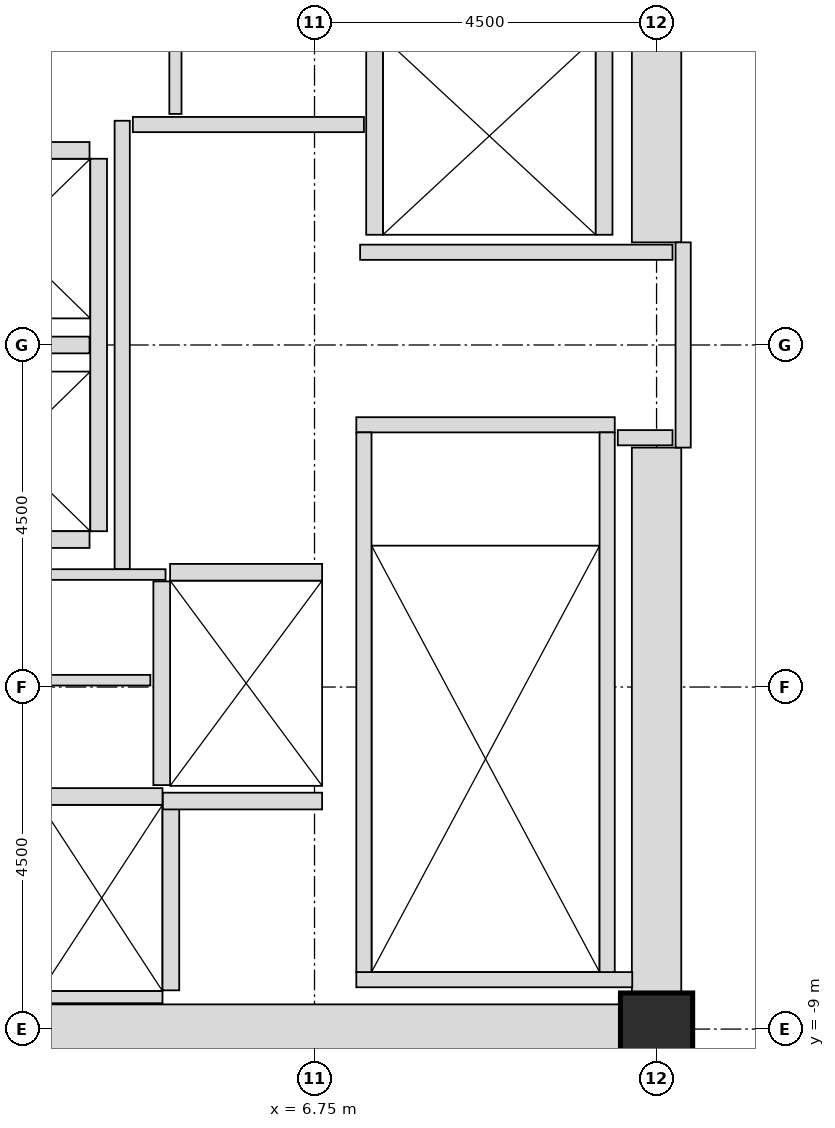
"""IFC4 building model, lengths in metres.
Left out: names, types, materials, properties, quantities, classifications, styles, units other than length and angle.
Written with IfcOpenShell. Run it as: python <this file> out.ifc"""

import sys

from ifc_helpers import new_model, si_unit, direction, frame, frame_2d, origin, origin_2d, place, context, subcontext, project, spatial, rectangle, hollow_rectangle, extrude, source, transform, mapped, element, fill, save


model = new_model("IFC4")
c1 = context("Model", 3, precision=1e-05, world=origin(), true_north=direction((0.0, 1.0)))
c2 = subcontext(c1, "Body", "Model", "MODEL_VIEW")
j1 = project(units=[si_unit("LENGTHUNIT", "METRE"), si_unit("PLANEANGLEUNIT", "RADIAN")], contexts=[c1])
p1 = place(None, origin())
s1 = spatial("IfcSite", under=j1, at=p1, CompositionType="ELEMENT")
p2 = place(p1, origin())
s2 = spatial("IfcBuilding", under=s1, at=p2, CompositionType="ELEMENT")
p3 = place(p2, frame((0.0, 0.0, 40.6)))
s3 = spatial("IfcBuildingStorey", under=s2, at=p3, CompositionType="ELEMENT", Elevation=40.6)
m1 = source(origin(), c2, "Body", "SweptSolid", [
    extrude(rectangle(XDim=10.025, YDim=0.65, at=frame_2d((5.012, 0.0))), origin(), (0.0, 0.0, 1.0), 3.8),
])
p4 = place(p3, frame((1.55, -9.0, 0.0), z_axis=(0.0, 0.0, 1.0), x_axis=(1.0, 0.0, 0.0)))
e1 = element("IfcWall", 1, at=p4, inside=s3, PredefinedType="SHEAR", context=c2, shape_type="MappedRepresentation", body=[
    mapped(m1, transform((0.0, 0.0, 0.0), x_axis=(1.0, 0.0, 0.0), y_axis=(0.0, 1.0, 0.0), z_axis=(0.0, 0.0, 1.0), scale=1.0)),
])
m2 = source(origin(), c2, "Body", "SweptSolid", [
    extrude(rectangle(XDim=7.325, YDim=0.65, at=frame_2d((3.663, 0.0))), origin(), (0.0, 0.0, 1.0), 3.8),
])
for number, where, z_axis, x_axis in (
    (2, (11.25, -8.675, 0.0), (0.0, 0.0, 1.0), (0.0, 1.0, 0.0)),
    (3, (11.25, 1.35, 0.0), (0.0, 0.0, 1.0), (0.0, 1.0, 0.0)),
):
    element("IfcWall", number, at=place(p3, frame(where, z_axis=z_axis, x_axis=x_axis)), inside=s3, PredefinedType="SHEAR", context=c2, shape_type="MappedRepresentation", body=[
        mapped(m2, transform((0.0, 0.0, 0.0), x_axis=(1.0, 0.0, 0.0), y_axis=(0.0, 1.0, 0.0), z_axis=(0.0, 0.0, 1.0), scale=1.0)),
    ])
m3 = source(origin(), c2, "Body", "SweptSolid", [
    extrude(hollow_rectangle(XDim=0.95, YDim=0.95, WallThickness=0.045, InnerFilletRadius=0.045, OuterFilletRadius=0.09, at=origin_2d()), origin(), (0.0, 0.0, 1.0), 3.8),
])
p5 = place(p3, frame((11.25, -9.0, 0.0), z_axis=(0.0, 0.0, 1.0), x_axis=(1.0, 0.0, 0.0)))
e4 = element("IfcColumn", 4, at=p5, inside=s3, PredefinedType="COLUMN", context=c2, shape_type="MappedRepresentation", body=[
    mapped(m3, transform((0.0, 0.0, 0.0), x_axis=(1.0, 0.0, 0.0), y_axis=(0.0, 1.0, 0.0), z_axis=(0.0, 0.0, 1.0), scale=1.0)),
])
m4 = source(origin(), c2, "Body", "SweptSolid", [
    extrude(rectangle(XDim=3.4, YDim=0.2, at=frame_2d((1.7, 0.0))), origin(), (0.0, 0.0, 1.0), 3.8),
])
p6 = place(p3, frame((7.3, -1.05, 0.0), z_axis=(0.0, 0.0, 1.0), x_axis=(1.0, 0.0, 0.0)))
e5 = element("IfcWall", 5, at=p6, inside=s3, PredefinedType="SOLIDWALL", context=c2, shape_type="MappedRepresentation", body=[
    mapped(m4, transform((0.0, 0.0, 0.0), x_axis=(1.0, 0.0, 0.0), y_axis=(0.0, 1.0, 0.0), z_axis=(0.0, 0.0, 1.0), scale=1.0)),
])
m5 = source(origin(), c2, "Body", "SweptSolid", [
    extrude(rectangle(XDim=3.63, YDim=0.2, at=frame_2d((1.815, 0.0))), origin(), (0.0, 0.0, 1.0), 3.8),
])
p7 = place(p3, frame((7.3, -8.35, 0.0), z_axis=(0.0, 0.0, 1.0), x_axis=(1.0, 0.0, 0.0)))
e6 = element("IfcWall", 6, at=p7, inside=s3, PredefinedType="SOLIDWALL", context=c2, shape_type="MappedRepresentation", body=[
    mapped(m5, transform((0.0, 0.0, 0.0), x_axis=(1.0, 0.0, 0.0), y_axis=(0.0, 1.0, 0.0), z_axis=(0.0, 0.0, 1.0), scale=1.0)),
])
m6 = source(origin(), c2, "Body", "SweptSolid", [
    extrude(rectangle(XDim=7.1, YDim=0.2, at=frame_2d((3.55, 0.0))), origin(), (0.0, 0.0, 1.0), 3.8),
])
p8 = place(p3, frame((7.4, -1.15, 0.0), z_axis=(0.0, 0.0, 1.0), x_axis=(0.0, -1.0, 0.0)))
e7 = element("IfcWall", 7, at=p8, inside=s3, PredefinedType="SOLIDWALL", context=c2, shape_type="MappedRepresentation", body=[
    mapped(m6, transform((0.0, 0.0, 0.0), x_axis=(1.0, 0.0, 0.0), y_axis=(0.0, 1.0, 0.0), z_axis=(0.0, 0.0, 1.0), scale=1.0)),
])
p9 = place(p8, frame((0.18, 0.0, 0.0)))
e8 = element("IfcOpeningElement", 8, at=p9, cuts=e7, PredefinedType="OPENING", context=c2, shape_type="SweptSolid", body=[
    extrude(rectangle(XDim=1.1, YDim=2.15, at=frame_2d((0.55, 1.075))), frame((0.0, 0.11, 0.0), z_axis=(0.0, -1.0, 0.0), x_axis=(1.0, 0.0, 0.0)), (0.0, 0.0, 1.0), 0.22),
])
p10 = place(p3, frame((10.6, -1.15, 0.0), z_axis=(0.0, 0.0, 1.0), x_axis=(0.0, -1.0, 0.0)))
e9 = element("IfcWall", 9, at=p10, inside=s3, PredefinedType="SOLIDWALL", context=c2, shape_type="MappedRepresentation", body=[
    mapped(m6, transform((0.0, 0.0, 0.0), x_axis=(1.0, 0.0, 0.0), y_axis=(0.0, 1.0, 0.0), z_axis=(0.0, 0.0, 1.0), scale=1.0)),
])
m7 = source(origin(), c2, "Body", "SweptSolid", [
    extrude(rectangle(XDim=2.0, YDim=0.22, at=frame_2d((1.0, 0.0))), origin(), (0.0, 0.0, 1.0), 3.535),
])
p11 = place(p3, frame((6.85, -2.99, 0.0), z_axis=(0.0, 0.0, 1.0), x_axis=(-1.0, 0.0, 0.0)))
e10 = element("IfcWall", 10, at=p11, inside=s3, PredefinedType="SOLIDWALL", context=c2, shape_type="MappedRepresentation", body=[
    mapped(m7, transform((0.0, 0.0, 0.0), x_axis=(1.0, 0.0, 0.0), y_axis=(0.0, 1.0, 0.0), z_axis=(0.0, 0.0, 1.0), scale=1.0)),
])
p12 = place(p11, frame((0.4, 0.0, 0.0)))
e11 = element("IfcOpeningElement", 11, at=p12, cuts=e10, PredefinedType="OPENING", context=c2, shape_type="SweptSolid", body=[
    extrude(rectangle(XDim=1.2, YDim=2.2, at=frame_2d((0.6, 1.1))), frame((0.0, 0.12, 0.0), z_axis=(0.0, -1.0, 0.0), x_axis=(1.0, 0.0, 0.0)), (0.0, 0.0, 1.0), 0.24),
])
m8 = source(origin(), c2, "Body", "SweptSolid", [
    extrude(rectangle(XDim=2.68, YDim=0.22, at=frame_2d((1.34, 0.0))), origin(), (0.0, 0.0, 1.0), 3.535),
])
p13 = place(p3, frame((4.74, -3.11, 0.0), z_axis=(0.0, 0.0, 1.0), x_axis=(0.0, -1.0, 0.0)))
e12 = element("IfcWall", 12, at=p13, inside=s3, PredefinedType="SOLIDWALL", context=c2, shape_type="MappedRepresentation", body=[
    mapped(m8, transform((0.0, 0.0, 0.0), x_axis=(1.0, 0.0, 0.0), y_axis=(0.0, 1.0, 0.0), z_axis=(0.0, 0.0, 1.0), scale=1.0)),
])
m9 = source(origin(), c2, "Body", "SweptSolid", [
    extrude(rectangle(XDim=5.45, YDim=0.22, at=frame_2d((2.725, 0.0))), origin(), (0.0, 0.0, 1.0), 3.535),
])
p14 = place(p3, frame((7.54, 6.9, 0.0), z_axis=(0.0, 0.0, 1.0), x_axis=(0.0, -1.0, 0.0)))
e13 = element("IfcWall", 13, at=p14, inside=s3, PredefinedType="SOLIDWALL", context=c2, shape_type="MappedRepresentation", body=[
    mapped(m9, transform((0.0, 0.0, 0.0), x_axis=(1.0, 0.0, 0.0), y_axis=(0.0, 1.0, 0.0), z_axis=(0.0, 0.0, 1.0), scale=1.0)),
])
p15 = place(p14, frame((3.5, 0.0, 0.0)))
e14 = element("IfcOpeningElement", 14, at=p15, cuts=e13, PredefinedType="OPENING", context=c2, shape_type="SweptSolid", body=[
    extrude(rectangle(XDim=1.3, YDim=2.3, at=frame_2d((0.65, 1.15))), frame((0.0, 0.12, 0.0), z_axis=(0.0, -1.0, 0.0), x_axis=(1.0, 0.0, 0.0)), (0.0, 0.0, 1.0), 0.24),
])
p16 = place(p14, frame((0.65, 0.0, 0.0)))
e15 = element("IfcOpeningElement", 15, at=p16, cuts=e13, PredefinedType="OPENING", context=c2, shape_type="SweptSolid", body=[
    extrude(rectangle(XDim=1.3, YDim=2.3, at=frame_2d((0.65, 1.15))), frame((0.0, 0.12, 0.0), z_axis=(0.0, -1.0, 0.0), x_axis=(1.0, 0.0, 0.0)), (0.0, 0.0, 1.0), 0.24),
])
p17 = place(p3, frame((10.56, 1.45, 0.0), z_axis=(0.0, 0.0, 1.0), x_axis=(0.0, 1.0, 0.0)))
e16 = element("IfcWall", 16, at=p17, inside=s3, PredefinedType="SOLIDWALL", context=c2, shape_type="MappedRepresentation", body=[
    mapped(m9, transform((0.0, 0.0, 0.0), x_axis=(1.0, 0.0, 0.0), y_axis=(0.0, 1.0, 0.0), z_axis=(0.0, 0.0, 1.0), scale=1.0)),
])
m10 = source(origin(), c2, "Body", "SweptSolid", [
    extrude(rectangle(XDim=3.2, YDim=0.22, at=frame_2d((1.6, 0.0))), origin(), (0.0, 0.0, 1.0), 3.535),
])
p18 = place(p3, frame((4.75, -5.94, 0.0), z_axis=(0.0, 0.0, 1.0), x_axis=(-1.0, 0.0, 0.0)))
e17 = element("IfcWall", 17, at=p18, inside=s3, PredefinedType="SOLIDWALL", context=c2, shape_type="MappedRepresentation", body=[
    mapped(m10, transform((0.0, 0.0, 0.0), x_axis=(1.0, 0.0, 0.0), y_axis=(0.0, 1.0, 0.0), z_axis=(0.0, 0.0, 1.0), scale=1.0)),
])
m11 = source(origin(), c2, "Body", "SweptSolid", [
    extrude(rectangle(XDim=3.2, YDim=0.16, at=frame_2d((1.6, 0.0))), origin(), (0.0, 0.0, 1.0), 2.425),
])
p19 = place(p3, frame((1.55, -8.58, 0.0), z_axis=(0.0, 0.0, 1.0), x_axis=(1.0, 0.0, 0.0)))
e18 = element("IfcWall", 18, at=p19, inside=s3, PredefinedType="PARTITIONING", context=c2, shape_type="MappedRepresentation", body=[
    mapped(m11, transform((0.0, 0.0, 0.0), x_axis=(1.0, 0.0, 0.0), y_axis=(0.0, 1.0, 0.0), z_axis=(0.0, 0.0, 1.0), scale=1.0)),
])
m12 = source(origin(), c2, "Body", "SweptSolid", [
    extrude(rectangle(XDim=2.43, YDim=0.22, at=frame_2d((1.215, 0.0))), origin(), (0.0, 0.0, 1.0), 3.535),
])
p20 = place(p3, frame((4.86, -8.49, 0.0), z_axis=(0.0, 0.0, 1.0), x_axis=(0.0, 1.0, 0.0)))
e19 = element("IfcWall", 19, at=p20, inside=s3, PredefinedType="SOLIDWALL", context=c2, shape_type="MappedRepresentation", body=[
    mapped(m12, transform((0.0, 0.0, 0.0), x_axis=(1.0, 0.0, 0.0), y_axis=(0.0, 1.0, 0.0), z_axis=(0.0, 0.0, 1.0), scale=1.0)),
])
m13 = source(origin(), c2, "Body", "SweptSolid", [
    extrude(rectangle(XDim=4.9, YDim=0.22, at=frame_2d((2.45, 0.0))), origin(), (0.0, 0.0, 1.0), 3.535),
])
p21 = place(p3, frame((3.91, -2.45, 0.0), z_axis=(0.0, 0.0, 1.0), x_axis=(0.0, 1.0, 0.0)))
e20 = element("IfcWall", 20, at=p21, inside=s3, PredefinedType="SOLIDWALL", context=c2, shape_type="MappedRepresentation", body=[
    mapped(m13, transform((0.0, 0.0, 0.0), x_axis=(1.0, 0.0, 0.0), y_axis=(0.0, 1.0, 0.0), z_axis=(0.0, 0.0, 1.0), scale=1.0)),
])
m14 = source(origin(), c2, "Body", "SweptSolid", [
    extrude(rectangle(XDim=2.13, YDim=0.22, at=frame_2d((1.065, 0.0))), origin(), (0.0, 0.0, 1.0), 3.535),
])
for number, where, z_axis, x_axis in (
    (21, (1.66, -2.56, 0.0), (0.0, 0.0, 1.0), (1.0, 0.0, 0.0)),
    (22, (1.66, 0.0, 0.0), (0.0, 0.0, 1.0), (1.0, 0.0, 0.0)),
    (23, (3.79, 2.56, 0.0), (0.0, 0.0, 1.0), (-1.0, 0.0, 0.0)),
):
    element("IfcWall", number, at=place(p3, frame(where, z_axis=z_axis, x_axis=x_axis)), inside=s3, PredefinedType="SOLIDWALL", context=c2, shape_type="MappedRepresentation", body=[
        mapped(m14, transform((0.0, 0.0, 0.0), x_axis=(1.0, 0.0, 0.0), y_axis=(0.0, 1.0, 0.0), z_axis=(0.0, 0.0, 1.0), scale=1.0)),
    ])
m15 = source(origin(), c2, "Body", "SweptSolid", [
    extrude(rectangle(XDim=2.095, YDim=0.22, at=frame_2d((1.048, 0.0))), origin(), (0.0, 0.0, 1.0), 3.535),
])
p22 = place(p3, frame((4.755, -6.0, 0.0), z_axis=(0.0, 0.0, 1.0), x_axis=(1.0, 0.0, 0.0)))
e24 = element("IfcWall", 24, at=p22, inside=s3, PredefinedType="SOLIDWALL", context=c2, shape_type="MappedRepresentation", body=[
    mapped(m15, transform((0.0, 0.0, 0.0), x_axis=(1.0, 0.0, 0.0), y_axis=(0.0, 1.0, 0.0), z_axis=(0.0, 0.0, 1.0), scale=1.0)),
])
m16 = source(origin(), c2, "Body", "SweptSolid", [
    extrude(rectangle(XDim=2.7, YDim=0.2, at=frame_2d((1.35, 0.0))), origin(), (0.0, 0.0, 1.0), 2.425),
])
p23 = place(p3, frame((11.6, -1.35, 0.0), z_axis=(0.0, 0.0, 1.0), x_axis=(0.0, 1.0, 0.0)))
e25 = element("IfcWall", 25, at=p23, inside=s3, PredefinedType="PARTITIONING", context=c2, shape_type="MappedRepresentation", body=[
    mapped(m16, transform((0.0, 0.0, 0.0), x_axis=(1.0, 0.0, 0.0), y_axis=(0.0, 1.0, 0.0), z_axis=(0.0, 0.0, 1.0), scale=1.0)),
])
p24 = place(p23, frame((0.75, 0.0, 0.0)))
e26 = element("IfcOpeningElement", 26, at=p24, cuts=e25, PredefinedType="OPENING", context=c2, shape_type="SweptSolid", body=[
    extrude(rectangle(XDim=1.2, YDim=2.15, at=frame_2d((0.6, 1.075))), frame((0.0, 0.11, 0.0), z_axis=(0.0, -1.0, 0.0), x_axis=(1.0, 0.0, 0.0)), (0.0, 0.0, 1.0), 0.22),
])
m17 = source(origin(), c2, "Body", "SweptSolid", [
    extrude(rectangle(XDim=5.9, YDim=0.2, at=frame_2d((2.95, 0.0))), origin(), (0.0, 0.0, 1.0), 3.535),
])
p25 = place(p3, frame((4.22, -2.95, 0.0), z_axis=(0.0, 0.0, 1.0), x_axis=(0.0, 1.0, 0.0)))
e27 = element("IfcWall", 27, at=p25, inside=s3, PredefinedType="PARTITIONING", context=c2, shape_type="MappedRepresentation", body=[
    mapped(m17, transform((0.0, 0.0, 0.0), x_axis=(1.0, 0.0, 0.0), y_axis=(0.0, 1.0, 0.0), z_axis=(0.0, 0.0, 1.0), scale=1.0)),
])
m18 = source(origin(), c2, "Body", "SweptSolid", [
    extrude(rectangle(XDim=3.04, YDim=0.2, at=frame_2d((1.52, 0.0))), origin(), (0.0, 0.0, 1.0), 3.535),
])
p26 = place(p3, frame((4.36, 2.9, 0.0), z_axis=(0.0, 0.0, 1.0), x_axis=(1.0, 0.0, 0.0)))
e28 = element("IfcWall", 28, at=p26, inside=s3, PredefinedType="PARTITIONING", context=c2, shape_type="MappedRepresentation", body=[
    mapped(m18, transform((0.0, 0.0, 0.0), x_axis=(1.0, 0.0, 0.0), y_axis=(0.0, 1.0, 0.0), z_axis=(0.0, 0.0, 1.0), scale=1.0)),
])
p27 = place(p26, frame((1.19, 0.0, 0.0)))
e29 = element("IfcOpeningElement", 29, at=p27, cuts=e28, PredefinedType="OPENING", context=c2, shape_type="SweptSolid", body=[
    extrude(rectangle(XDim=1.2, YDim=2.15, at=frame_2d((0.6, 1.075))), frame((0.0, 0.11, 0.0), z_axis=(0.0, -1.0, 0.0), x_axis=(1.0, 0.0, 0.0)), (0.0, 0.0, 1.0), 0.22),
])
m19 = source(origin(), c2, "Body", "SweptSolid", [
    extrude(rectangle(XDim=4.11, YDim=0.2, at=frame_2d((2.055, 0.0))), origin(), (0.0, 0.0, 1.0), 3.535),
])
p28 = place(p3, frame((7.35, 1.22, 0.0), z_axis=(0.0, 0.0, 1.0), x_axis=(1.0, 0.0, 0.0)))
e30 = element("IfcWall", 30, at=p28, inside=s3, PredefinedType="PARTITIONING", context=c2, shape_type="MappedRepresentation", body=[
    mapped(m19, transform((0.0, 0.0, 0.0), x_axis=(1.0, 0.0, 0.0), y_axis=(0.0, 1.0, 0.0), z_axis=(0.0, 0.0, 1.0), scale=1.0)),
])
m20 = source(origin(), c2, "Body", "SweptSolid", [
    extrude(rectangle(XDim=0.72, YDim=0.2, at=frame_2d((0.36, 0.0))), origin(), (0.0, 0.0, 1.0), 3.535),
])
p29 = place(p3, frame((10.74, -1.22, 0.0), z_axis=(0.0, 0.0, 1.0), x_axis=(1.0, 0.0, 0.0)))
e31 = element("IfcWall", 31, at=p29, inside=s3, PredefinedType="PARTITIONING", context=c2, shape_type="MappedRepresentation", body=[
    mapped(m20, transform((0.0, 0.0, 0.0), x_axis=(1.0, 0.0, 0.0), y_axis=(0.0, 1.0, 0.0), z_axis=(0.0, 0.0, 1.0), scale=1.0)),
])
m21 = source(origin(), c2, "Body", "SweptSolid", [
    extrude(rectangle(XDim=3.015, YDim=0.16, at=frame_2d((1.507, 0.0))), origin(), (0.0, 0.0, 1.0), 3.535),
])
p30 = place(p3, frame((4.92, 3.04, 0.0), z_axis=(0.0, 0.0, 1.0), x_axis=(0.0, 1.0, 0.0)))
e32 = element("IfcWall", 32, at=p30, inside=s3, PredefinedType="PARTITIONING", context=c2, shape_type="MappedRepresentation", body=[
    mapped(m21, transform((0.0, 0.0, 0.0), x_axis=(1.0, 0.0, 0.0), y_axis=(0.0, 1.0, 0.0), z_axis=(0.0, 0.0, 1.0), scale=1.0)),
])
m22 = source(origin(), c2, "Body", "SweptSolid", [
    extrude(rectangle(XDim=3.15, YDim=0.14, at=frame_2d((1.575, 0.0))), origin(), (0.0, 0.0, 1.0), 3.535),
])
p31 = place(p3, frame((1.64, -3.02, 0.0), z_axis=(0.0, 0.0, 1.0), x_axis=(1.0, 0.0, 0.0)))
e33 = element("IfcWall", 33, at=p31, inside=s3, PredefinedType="PARTITIONING", context=c2, shape_type="MappedRepresentation", body=[
    mapped(m22, transform((0.0, 0.0, 0.0), x_axis=(1.0, 0.0, 0.0), y_axis=(0.0, 1.0, 0.0), z_axis=(0.0, 0.0, 1.0), scale=1.0)),
])
m23 = source(origin(), c2, "Body", "SweptSolid", [
    extrude(rectangle(XDim=2.95, YDim=0.14, at=frame_2d((1.475, 0.0))), origin(), (0.0, 0.0, 1.0), 3.535),
])
p32 = place(p3, frame((1.64, -4.41, 0.0), z_axis=(0.0, 0.0, 1.0), x_axis=(1.0, 0.0, 0.0)))
e34 = element("IfcWall", 34, at=p32, inside=s3, PredefinedType="PARTITIONING", context=c2, shape_type="MappedRepresentation", body=[
    mapped(m23, transform((0.0, 0.0, 0.0), x_axis=(1.0, 0.0, 0.0), y_axis=(0.0, 1.0, 0.0), z_axis=(0.0, 0.0, 1.0), scale=1.0)),
])
m24 = source(origin(), c2, "Body", "SweptSolid", [
    extrude(rectangle(XDim=1.1, YDim=2.15, at=frame_2d((0.55, 1.075))), frame((0.0, 0.025, 0.0), z_axis=(0.0, -1.0, 0.0), x_axis=(1.0, 0.0, 0.0)), (0.0, 0.0, 1.0), 0.05),
])
p33 = place(p9, origin())
e35 = element("IfcDoor", 35, at=p33, inside=s3, OperationType="SINGLE_SWING_LEFT", PredefinedType="DOOR", context=c2, shape_type="MappedRepresentation", body=[
    mapped(m24, transform((0.0, 0.0, 0.0), x_axis=(1.0, 0.0, 0.0), y_axis=(0.0, 1.0, 0.0), z_axis=(0.0, 0.0, 1.0), scale=1.0)),
])
fill(e8, e35)
m25 = source(origin(), c2, "Body", "SweptSolid", [
    extrude(rectangle(XDim=1.2, YDim=2.2, at=frame_2d((0.6, 1.1))), frame((0.0, 0.025, 0.0), z_axis=(0.0, -1.0, 0.0), x_axis=(1.0, 0.0, 0.0)), (0.0, 0.0, 1.0), 0.05),
])
p34 = place(p12, origin())
e36 = element("IfcDoor", 36, at=p34, inside=s3, OperationType="SLIDING_TO_LEFT", PredefinedType="DOOR", context=c2, shape_type="MappedRepresentation", body=[
    mapped(m25, transform((0.0, 0.0, 0.0), x_axis=(1.0, 0.0, 0.0), y_axis=(0.0, 1.0, 0.0), z_axis=(0.0, 0.0, 1.0), scale=1.0)),
])
fill(e11, e36)
m26 = source(origin(), c2, "Body", "SweptSolid", [
    extrude(rectangle(XDim=1.3, YDim=2.3, at=frame_2d((0.65, 1.15))), frame((0.0, 0.025, 0.0), z_axis=(0.0, -1.0, 0.0), x_axis=(1.0, 0.0, 0.0)), (0.0, 0.0, 1.0), 0.05),
])
p35 = place(p15, origin())
e37 = element("IfcDoor", 37, at=p35, inside=s3, OperationType="SLIDING_TO_RIGHT", PredefinedType="DOOR", context=c2, shape_type="MappedRepresentation", body=[
    mapped(m26, transform((0.0, 0.0, 0.0), x_axis=(1.0, 0.0, 0.0), y_axis=(0.0, 1.0, 0.0), z_axis=(0.0, 0.0, 1.0), scale=1.0)),
])
fill(e14, e37)
m27 = source(origin(), c2, "Body", "SweptSolid", [
    extrude(rectangle(XDim=1.2, YDim=2.15, at=frame_2d((0.6, 1.075))), frame((0.0, 0.025, 0.0), z_axis=(0.0, -1.0, 0.0), x_axis=(1.0, 0.0, 0.0)), (0.0, 0.0, 1.0), 0.05),
])
p36 = place(p24, origin())
e38 = element("IfcDoor", 38, at=p36, inside=s3, OperationType="SINGLE_SWING_RIGHT", PredefinedType="DOOR", context=c2, shape_type="MappedRepresentation", body=[
    mapped(m27, transform((0.0, 0.0, 0.0), x_axis=(1.0, 0.0, 0.0), y_axis=(0.0, 1.0, 0.0), z_axis=(0.0, 0.0, 1.0), scale=1.0)),
])
fill(e26, e38)
p37 = place(p27, origin())
e39 = element("IfcDoor", 39, at=p37, inside=s3, OperationType="SINGLE_SWING_LEFT", PredefinedType="DOOR", context=c2, shape_type="MappedRepresentation", body=[
    mapped(m27, transform((0.0, 0.0, 0.0), x_axis=(1.0, 0.0, 0.0), y_axis=(0.0, 1.0, 0.0), z_axis=(0.0, 0.0, 1.0), scale=1.0)),
])
fill(e29, e39)
save(model, sys.argv[1])
